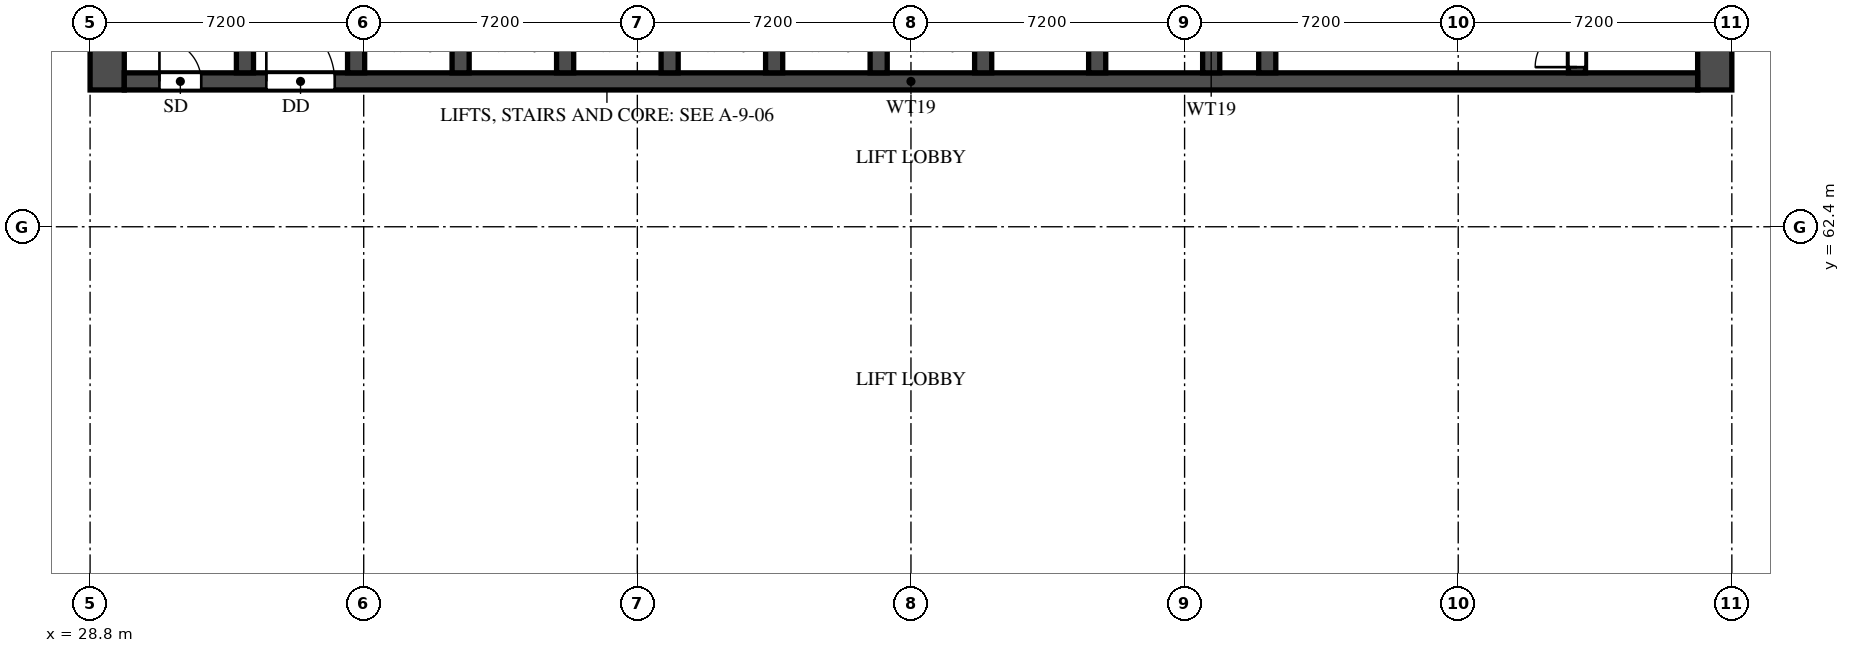
"""IFC4 building model, lengths in metres.
Left out: names, types, materials, properties, quantities, classifications, styles, units other than length and angle.
Written with IfcOpenShell. Run it as: python <this file> out.ifc"""

import sys

from ifc_helpers import new_model, si_unit, direction, frame, frame_2d, origin, place, context, subcontext, project, spatial, rectangle, extrude, element, fill, save


model = new_model("IFC4")
c1 = context("Model", 3, precision=1e-05, world=origin(), true_north=direction((0.0, 1.0)))
c2 = subcontext(c1, "Body", "Model", "MODEL_VIEW")
j1 = project(units=[si_unit("LENGTHUNIT", "METRE"), si_unit("PLANEANGLEUNIT", "RADIAN")], contexts=[c1])
p1 = place(None, origin())
s1 = spatial("IfcSite", under=j1, at=p1, CompositionType="ELEMENT")
p2 = place(p1, origin())
s2 = spatial("IfcBuilding", under=s1, at=p2, CompositionType="ELEMENT")
p3 = place(p2, frame((0.0, 0.0, 21.6)))
s3 = spatial("IfcBuildingStorey", under=s2, at=p3, CompositionType="ELEMENT", Elevation=21.6)
for number, where, z_axis, x_axis in (
    (1, (29.25, 66.0, 0.0), (0.0, 0.0, 1.0), (0.0, 1.0, 0.0)),
    (2, (71.55, 66.0, 0.0), (0.0, 0.0, 1.0), (0.0, 1.0, 0.0)),
):
    element("IfcWall", number, at=place(p3, frame(where, z_axis=z_axis, x_axis=x_axis)), inside=s3, PredefinedType="SHEAR", context=c2, shape_type="SweptSolid", body=[
        extrude(rectangle(XDim=12.0, YDim=0.9, at=frame_2d((6.0, 0.0))), origin(), (0.0, 0.0, 1.0), 4.95),
    ])
p4 = place(p3, frame((29.7, 66.225, 0.0), z_axis=(0.0, 0.0, 1.0), x_axis=(1.0, 0.0, 0.0)))
e3 = element("IfcWall", 3, at=p4, inside=s3, PredefinedType="SHEAR", context=c2, shape_type="SweptSolid", body=[
    extrude(rectangle(XDim=41.4, YDim=0.45, at=frame_2d((20.7, 0.0))), origin(), (0.0, 0.0, 1.0), 4.95),
])
p5 = place(p4, frame((0.925, 0.0, 0.0)))
e4 = element("IfcOpeningElement", 4, at=p5, cuts=e3, PredefinedType="OPENING", context=c2, shape_type="SweptSolid", body=[
    extrude(rectangle(XDim=1.1, YDim=2.1, at=frame_2d((0.55, 1.05))), frame((0.0, 0.235, 0.0), z_axis=(0.0, -1.0, 0.0), x_axis=(1.0, 0.0, 0.0)), (0.0, 0.0, 1.0), 0.47),
])
p6 = place(p4, frame((3.738, 0.0, 0.0)))
e5 = element("IfcOpeningElement", 5, at=p6, cuts=e3, PredefinedType="OPENING", context=c2, shape_type="SweptSolid", body=[
    extrude(rectangle(XDim=1.8, YDim=2.1, at=frame_2d((0.9, 1.05))), frame((0.0, 0.235, 0.0), z_axis=(0.0, -1.0, 0.0), x_axis=(1.0, 0.0, 0.0)), (0.0, 0.0, 1.0), 0.47),
])
p7 = place(p3, frame((32.875, 66.45, 0.0), z_axis=(0.0, 0.0, 1.0), x_axis=(0.0, 1.0, 0.0)))
e6 = element("IfcWall", 6, at=p7, inside=s3, PredefinedType="SHEAR", context=c2, shape_type="SweptSolid", body=[
    extrude(rectangle(XDim=10.65, YDim=0.45, at=frame_2d((5.325, 0.0))), origin(), (0.0, 0.0, 1.0), 4.95),
])
p8 = place(p3, frame((67.925, 66.45, 0.0), z_axis=(0.0, 0.0, 1.0), x_axis=(0.0, 1.0, 0.0)))
e7 = element("IfcWall", 7, at=p8, inside=s3, PredefinedType="SHEAR", context=c2, shape_type="SweptSolid", body=[
    extrude(rectangle(XDim=10.65, YDim=0.45, at=frame_2d((5.325, 0.0))), origin(), (0.0, 0.0, 1.0), 4.95),
])
p9 = place(p8, frame((0.15, 0.0, 0.0)))
e8 = element("IfcOpeningElement", 8, at=p9, cuts=e7, PredefinedType="OPENING", context=c2, shape_type="SweptSolid", body=[
    extrude(rectangle(XDim=1.1, YDim=2.1, at=frame_2d((0.55, 1.05))), frame((0.0, 0.235, 0.0), z_axis=(0.0, -1.0, 0.0), x_axis=(1.0, 0.0, 0.0)), (0.0, 0.0, 1.0), 0.47),
])
p10 = place(p3, frame((59.775, 66.45, 0.0), z_axis=(0.0, 0.0, 1.0), x_axis=(0.0, 1.0, 0.0)))
e9 = element("IfcWall", 9, at=p10, inside=s3, PredefinedType="SHEAR", context=c2, shape_type="SweptSolid", body=[
    extrude(rectangle(XDim=6.025, YDim=0.45, at=frame_2d((3.013, 0.0))), origin(), (0.0, 0.0, 1.0), 4.95),
])
p11 = place(p10, frame((3.85, 0.0, 0.0)))
e10 = element("IfcOpeningElement", 10, at=p11, cuts=e9, PredefinedType="OPENING", context=c2, shape_type="SweptSolid", body=[
    extrude(rectangle(XDim=1.2, YDim=2.1, at=frame_2d((0.6, 1.05))), frame((0.0, 0.235, 0.0), z_axis=(0.0, -1.0, 0.0), x_axis=(1.0, 0.0, 0.0)), (0.0, 0.0, 1.0), 0.47),
])
for number, where, z_axis, x_axis in (
    (11, (35.8, 66.45, 0.0), (0.0, 0.0, 1.0), (0.0, 1.0, 0.0)),
    (12, (38.55, 66.45, 0.0), (0.0, 0.0, 1.0), (0.0, 1.0, 0.0)),
    (13, (41.3, 66.45, 0.0), (0.0, 0.0, 1.0), (0.0, 1.0, 0.0)),
    (14, (44.05, 66.45, 0.0), (0.0, 0.0, 1.0), (0.0, 1.0, 0.0)),
    (15, (46.8, 66.45, 0.0), (0.0, 0.0, 1.0), (0.0, 1.0, 0.0)),
    (16, (49.55, 66.45, 0.0), (0.0, 0.0, 1.0), (0.0, 1.0, 0.0)),
    (17, (52.3, 66.45, 0.0), (0.0, 0.0, 1.0), (0.0, 1.0, 0.0)),
    (18, (55.3, 66.45, 0.0), (0.0, 0.0, 1.0), (0.0, 1.0, 0.0)),
    (19, (58.3, 66.45, 0.0), (0.0, 0.0, 1.0), (0.0, 1.0, 0.0)),
):
    element("IfcWall", number, at=place(p3, frame(where, z_axis=z_axis, x_axis=x_axis)), inside=s3, PredefinedType="SHEAR", context=c2, shape_type="SweptSolid", body=[
        extrude(rectangle(XDim=2.425, YDim=0.45, at=frame_2d((1.212, 0.0))), origin(), (0.0, 0.0, 1.0), 4.95),
    ])
p12 = place(p5, origin())
e20 = element("IfcDoor", 20, at=p12, inside=s3, OperationType="SINGLE_SWING_LEFT", PredefinedType="DOOR", context=c2, shape_type="SweptSolid", body=[
    extrude(rectangle(XDim=1.1, YDim=2.1, at=frame_2d((0.55, 1.05))), frame((0.0, 0.025, 0.0), z_axis=(0.0, -1.0, 0.0), x_axis=(1.0, 0.0, 0.0)), (0.0, 0.0, 1.0), 0.05),
])
fill(e4, e20)
p13 = place(p9, origin())
e21 = element("IfcDoor", 21, at=p13, inside=s3, OperationType="SINGLE_SWING_LEFT", PredefinedType="DOOR", context=c2, shape_type="SweptSolid", body=[
    extrude(rectangle(XDim=1.1, YDim=2.1, at=frame_2d((0.55, 1.05))), frame((0.0, 0.025, 0.0), z_axis=(0.0, -1.0, 0.0), x_axis=(1.0, 0.0, 0.0)), (0.0, 0.0, 1.0), 0.05),
])
fill(e8, e21)
p14 = place(p6, origin())
e22 = element("IfcDoor", 22, at=p14, inside=s3, OperationType="DOUBLE_DOOR_SINGLE_SWING", PredefinedType="DOOR", context=c2, shape_type="SweptSolid", body=[
    extrude(rectangle(XDim=1.8, YDim=2.1, at=frame_2d((0.9, 1.05))), frame((0.0, 0.025, 0.0), z_axis=(0.0, -1.0, 0.0), x_axis=(1.0, 0.0, 0.0)), (0.0, 0.0, 1.0), 0.05),
])
fill(e5, e22)
save(model, sys.argv[1])
